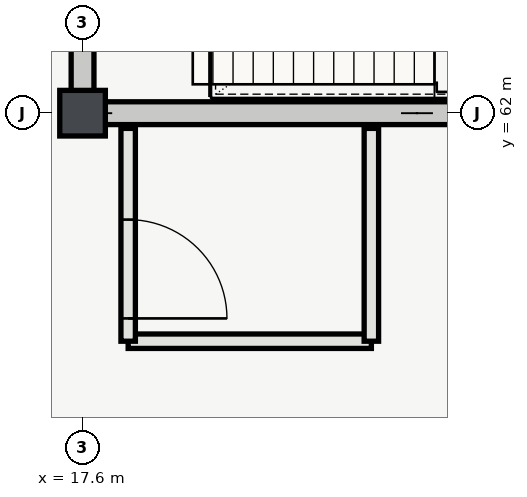
"""IFC4 building model, lengths in metres.
Left out: names, types, materials, properties, quantities, classifications, styles, units other than length and angle.
Written with IfcOpenShell. Run it as: python <this file> out.ifc"""

import sys

from ifc_helpers import new_model, si_unit, direction, frame, frame_2d, origin, origin_2d, place, context, subcontext, project, spatial, rectangle, extrude, element, fill, save


model = new_model("IFC4")
c1 = context("Model", 3, precision=1e-05, world=origin(), true_north=direction((0.0, 1.0)))
c2 = subcontext(c1, "Body", "Model", "MODEL_VIEW")
j1 = project(units=[si_unit("LENGTHUNIT", "METRE"), si_unit("PLANEANGLEUNIT", "RADIAN")], contexts=[c1])
p1 = place(None, origin())
s1 = spatial("IfcSite", under=j1, at=p1, CompositionType="ELEMENT")
p2 = place(p1, origin())
s2 = spatial("IfcBuilding", under=s1, at=p2, CompositionType="ELEMENT")
p3 = place(p2, frame((0.0, 0.0, 16.2)))
s3 = spatial("IfcBuildingStorey", under=s2, at=p3, CompositionType="ELEMENT", Elevation=16.2)
p4 = place(p3, frame((17.6, 62.0, 0.0), z_axis=(0.0, 0.0, 1.0), x_axis=(1.0, 0.0, 0.0)))
e1 = element("IfcColumn", 1, at=p4, inside=s3, PredefinedType="COLUMN", context=c2, shape_type="SweptSolid", body=[
    extrude(rectangle(XDim=0.6, YDim=0.6, at=origin_2d()), origin(), (0.0, 0.0, 1.0), 4.2),
])
p5 = place(p3, frame((17.45, 62.0, 0.0), z_axis=(0.0, 0.0, 1.0), x_axis=(1.0, 0.0, 0.0)))
e2 = element("IfcWall", 2, at=p5, inside=s3, PredefinedType="SHEAR", context=c2, shape_type="SweptSolid", body=[
    extrude(rectangle(XDim=9.1, YDim=0.3, at=frame_2d((4.55, 0.0))), origin(), (0.0, 0.0, 1.0), 3.92),
])
p6 = place(p3, frame((17.6, 62.15, 0.0), z_axis=(0.0, 0.0, 1.0), x_axis=(0.0, 1.0, 0.0)))
e3 = element("IfcWall", 3, at=p6, inside=s3, PredefinedType="SHEAR", context=c2, shape_type="SweptSolid", body=[
    extrude(rectangle(XDim=7.7, YDim=0.3, at=frame_2d((3.85, 0.0))), origin(), (0.0, 0.0, 1.0), 3.92),
])
p7 = place(p6, frame((1.675, 0.0, 0.0)))
e4 = element("IfcOpeningElement", 4, at=p7, cuts=e3, PredefinedType="OPENING", context=c2, shape_type="SweptSolid", body=[
    extrude(rectangle(XDim=1.35, YDim=2.2, at=frame_2d((0.675, 1.1))), frame((0.0, 0.16, 0.0), z_axis=(0.0, -1.0, 0.0), x_axis=(1.0, 0.0, 0.0)), (0.0, 0.0, 1.0), 0.32),
])
p8 = place(p6, frame((5.7, 0.0, 0.0)))
e5 = element("IfcOpeningElement", 5, at=p8, cuts=e3, PredefinedType="OPENING", context=c2, shape_type="SweptSolid", body=[
    extrude(rectangle(XDim=1.0, YDim=2.15, at=frame_2d((0.5, 1.075))), frame((0.0, 0.16, 0.0), z_axis=(0.0, -1.0, 0.0), x_axis=(1.0, 0.0, 0.0)), (0.0, 0.0, 1.0), 0.32),
])
p9 = place(p3, frame((18.2, 59.0, 0.0), z_axis=(0.0, 0.0, 1.0), x_axis=(1.0, 0.0, 0.0)))
e6 = element("IfcWall", 6, at=p9, inside=s3, PredefinedType="PARTITIONING", context=c2, shape_type="SweptSolid", body=[
    extrude(rectangle(XDim=3.2, YDim=0.19, at=frame_2d((1.6, 0.0))), origin(), (0.0, 0.0, 1.0), 3.92),
])
p10 = place(p3, frame((18.2, 61.8, 0.0), z_axis=(0.0, 0.0, 1.0), x_axis=(0.0, -1.0, 0.0)))
e7 = element("IfcWall", 7, at=p10, inside=s3, PredefinedType="PARTITIONING", context=c2, shape_type="SweptSolid", body=[
    extrude(rectangle(XDim=2.8, YDim=0.19, at=frame_2d((1.4, 0.0))), origin(), (0.0, 0.0, 1.0), 3.92),
])
p11 = place(p10, frame((1.2, 0.0, 0.0)))
e8 = element("IfcOpeningElement", 8, at=p11, cuts=e7, PredefinedType="OPENING", context=c2, shape_type="SweptSolid", body=[
    extrude(rectangle(XDim=1.3, YDim=2.2, at=frame_2d((0.65, 1.1))), frame((0.0, 0.105, 0.0), z_axis=(0.0, -1.0, 0.0), x_axis=(1.0, 0.0, 0.0)), (0.0, 0.0, 1.0), 0.21),
])
p12 = place(p3, frame((21.4, 59.0, 0.0), z_axis=(0.0, 0.0, 1.0), x_axis=(0.0, 1.0, 0.0)))
e9 = element("IfcWall", 9, at=p12, inside=s3, PredefinedType="PARTITIONING", context=c2, shape_type="SweptSolid", body=[
    extrude(rectangle(XDim=2.8, YDim=0.19, at=frame_2d((1.4, 0.0))), origin(), (0.0, 0.0, 1.0), 3.92),
])
p13 = place(p11, origin())
e10 = element("IfcDoor", 10, at=p13, inside=s3, OperationType="SINGLE_SWING_RIGHT", PredefinedType="DOOR", context=c2, shape_type="SweptSolid", body=[
    extrude(rectangle(XDim=1.3, YDim=2.2, at=frame_2d((0.65, 1.1))), frame((0.0, 0.025, 0.0), z_axis=(0.0, -1.0, 0.0), x_axis=(1.0, 0.0, 0.0)), (0.0, 0.0, 1.0), 0.05),
])
fill(e8, e10)
save(model, sys.argv[1])
